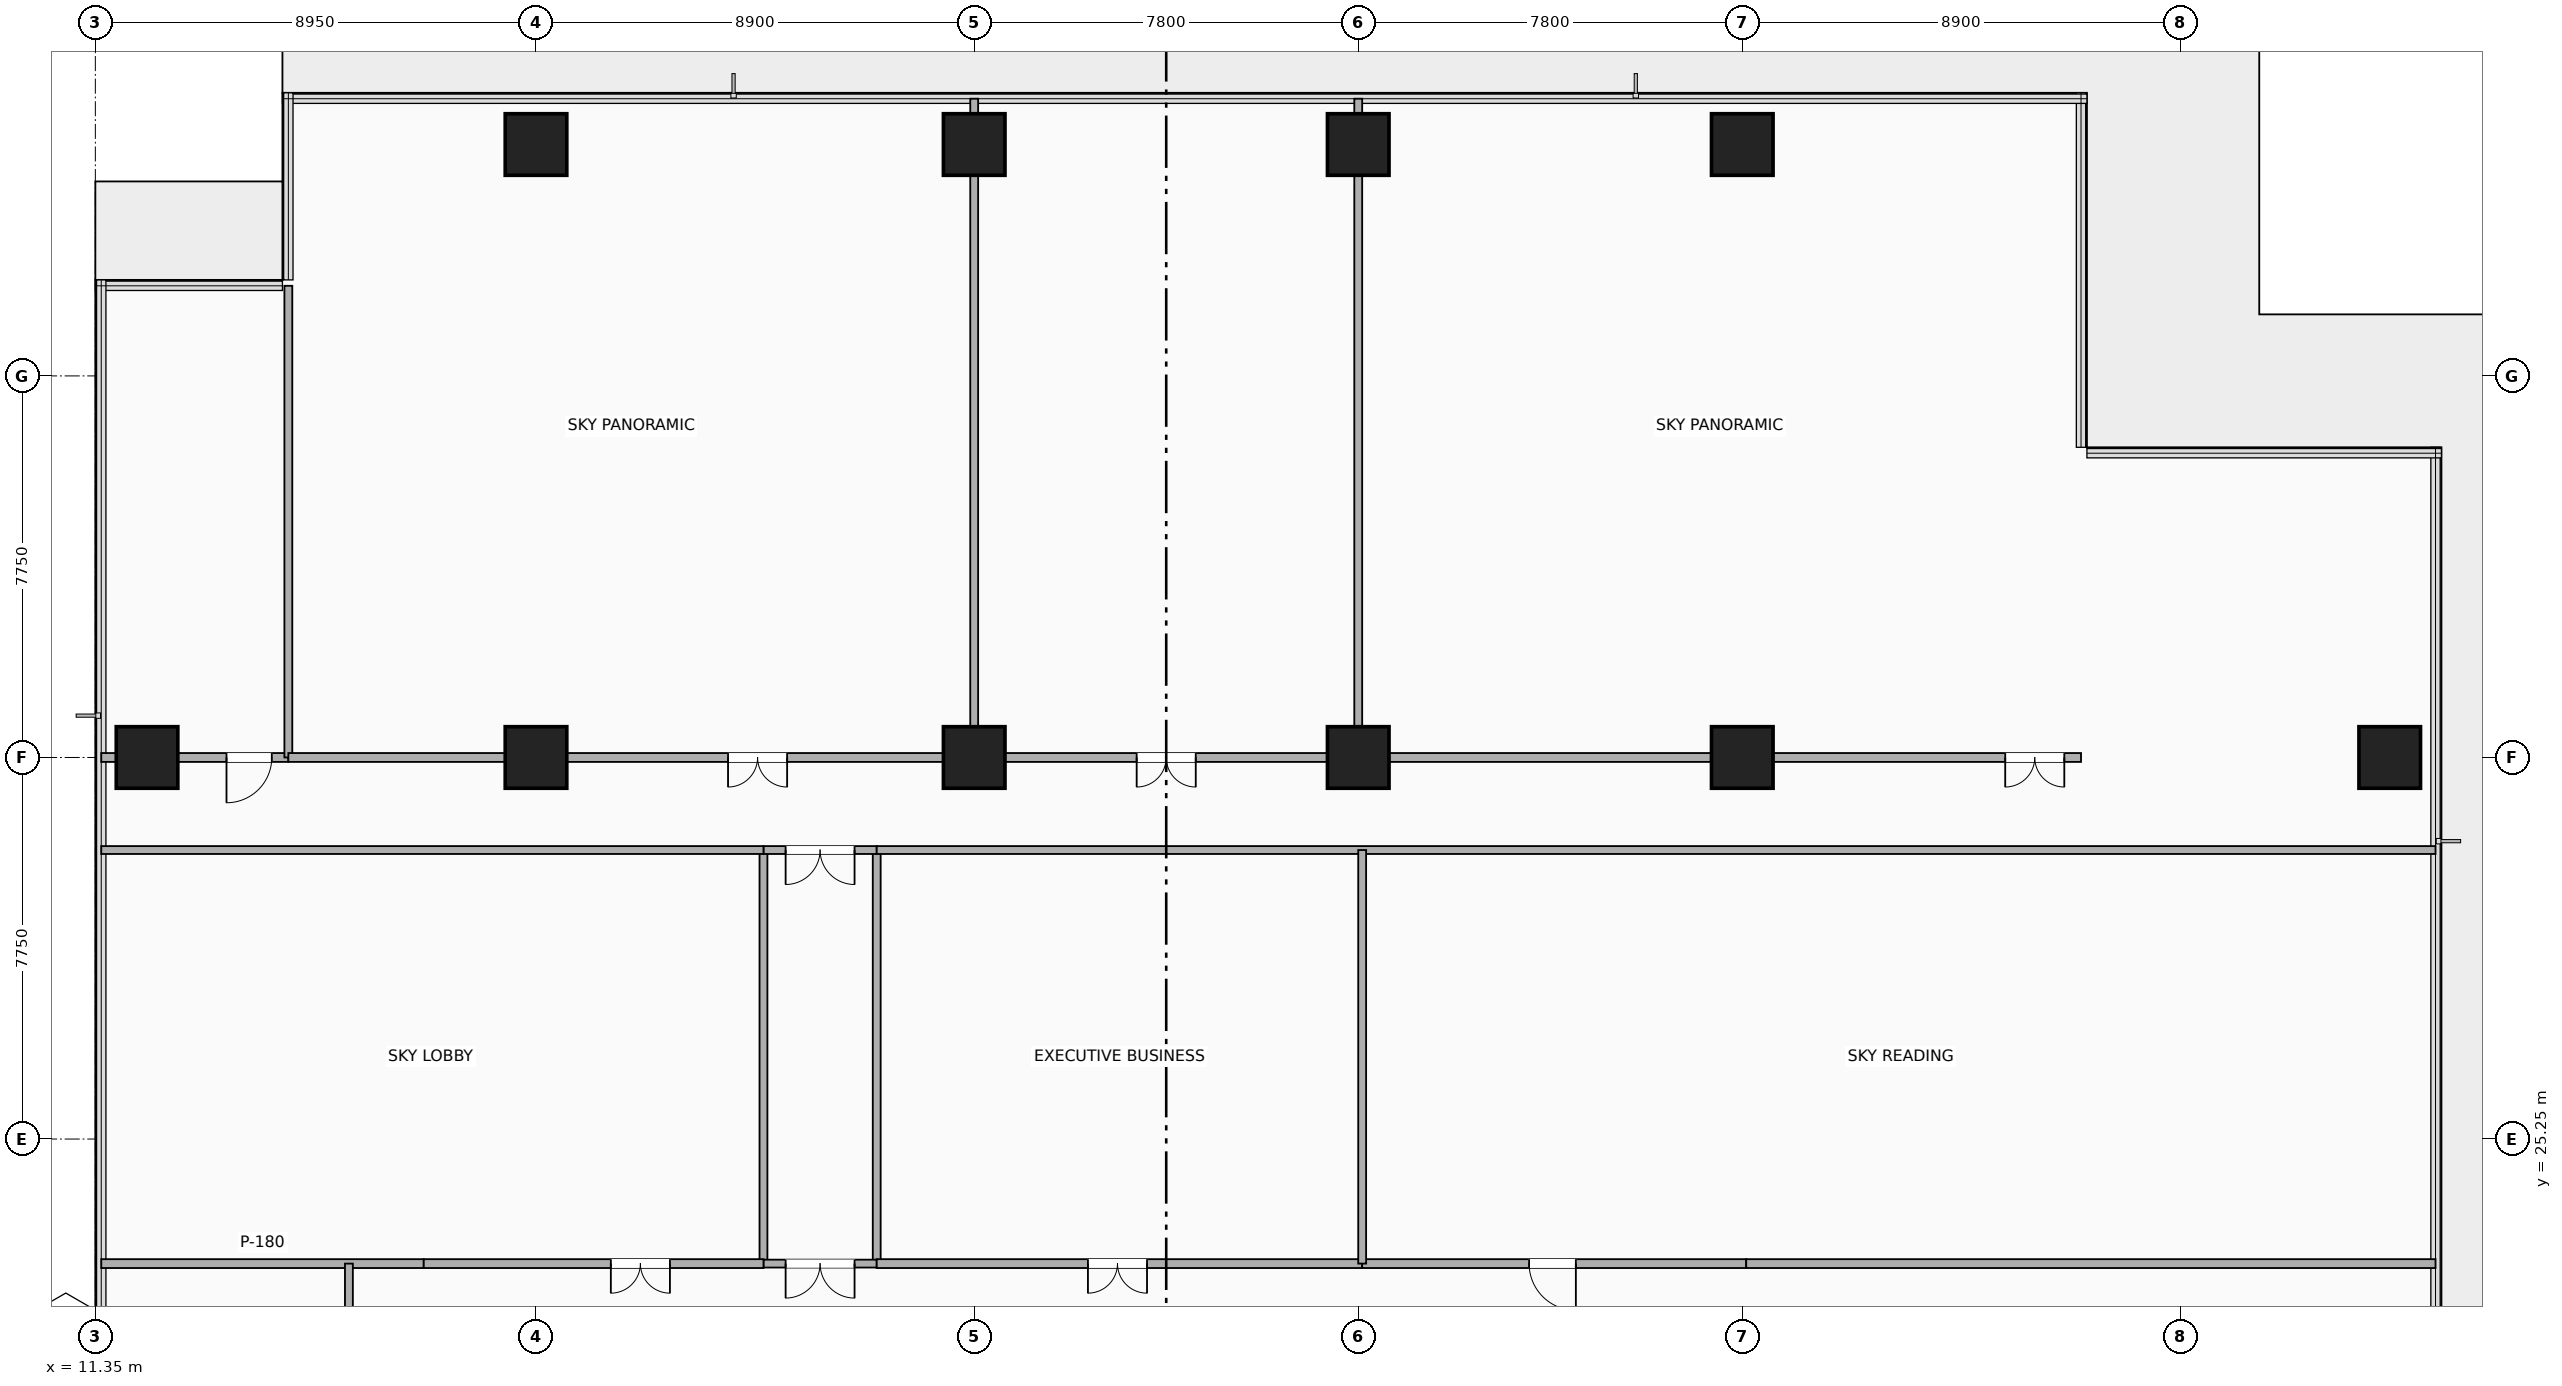
"""IFC4 building model, lengths in metres.
Left out: names, types, materials, properties, quantities, classifications, styles, units other than length and angle.
Written with IfcOpenShell. Run it as: python <this file> out.ifc"""

import sys

from ifc_helpers import new_model, si_unit, direction, frame, frame_2d, origin, origin_2d, place, context, subcontext, project, spatial, rectangle, extrude, element, fill, save


model = new_model("IFC4")
c1 = context("Model", 3, precision=1e-05, world=origin(), true_north=direction((0.0, 1.0)))
c2 = subcontext(c1, "Body", "Model", "MODEL_VIEW")
j1 = project(units=[si_unit("LENGTHUNIT", "METRE"), si_unit("PLANEANGLEUNIT", "RADIAN")], contexts=[c1])
p1 = place(None, origin())
s1 = spatial("IfcSite", under=j1, at=p1, CompositionType="ELEMENT")
p2 = place(p1, origin())
s2 = spatial("IfcBuilding", under=s1, at=p2, CompositionType="ELEMENT")
p3 = place(p2, frame((0.0, 0.0, 83.8)))
s3 = spatial("IfcBuildingStorey", under=s2, at=p3, CompositionType="ELEMENT", Elevation=83.8)
for number, where, z_axis, x_axis in (
    (1, (20.3, 33.0, -0.26), (0.0, 0.0, 1.0), (1.0, 0.0, 0.0)),
    (2, (29.2, 33.0, -0.26), (0.0, 0.0, 1.0), (1.0, 0.0, 0.0)),
    (3, (37.0, 33.0, -0.26), (0.0, 0.0, 1.0), (1.0, 0.0, 0.0)),
    (4, (44.8, 33.0, -0.26), (0.0, 0.0, 1.0), (1.0, 0.0, 0.0)),
    (5, (12.4, 33.0, -0.26), (0.0, 0.0, 1.0), (1.0, 0.0, 0.0)),
    (6, (57.95, 33.0, -0.26), (0.0, 0.0, 1.0), (1.0, 0.0, 0.0)),
    (7, (20.3, 45.45, -0.26), (0.0, 0.0, 1.0), (1.0, 0.0, 0.0)),
    (8, (29.2, 45.45, -0.26), (0.0, 0.0, 1.0), (1.0, 0.0, 0.0)),
    (9, (37.0, 45.45, -0.26), (0.0, 0.0, 1.0), (1.0, 0.0, 0.0)),
    (10, (44.8, 45.45, -0.26), (0.0, 0.0, 1.0), (1.0, 0.0, 0.0)),
):
    element("IfcColumn", number, at=place(p3, frame(where, z_axis=z_axis, x_axis=x_axis)), inside=s3, PredefinedType="COLUMN", context=c2, shape_type="SweptSolid", body=[
        extrude(rectangle(XDim=1.25, YDim=1.25, at=origin_2d()), origin(), (0.0, 0.0, 1.0), 4.4),
    ])
p4 = place(p3, frame((11.47, 22.72, 0.0), z_axis=(0.0, 0.0, 1.0), x_axis=(1.0, 0.0, 0.0)))
e11 = element("IfcWall", 11, at=p4, inside=s3, PredefinedType="PARTITIONING", context=c2, shape_type="SweptSolid", body=[
    extrude(rectangle(XDim=6.55, YDim=0.18, at=frame_2d((3.275, 0.0))), origin(), (0.0, 0.0, 1.0), 3.503),
])
p5 = place(p3, frame((16.5, 18.52, 0.0), z_axis=(0.0, 0.0, 1.0), x_axis=(0.0, 1.0, 0.0)))
e12 = element("IfcWall", 12, at=p5, inside=s3, PredefinedType="PARTITIONING", context=c2, shape_type="SweptSolid", body=[
    extrude(rectangle(XDim=4.2, YDim=0.16, at=frame_2d((2.1, 0.0))), origin(), (0.0, 0.0, 1.0), 3.213),
])
p6 = place(p5, frame((0.693, 0.0, 0.0)))
e13 = element("IfcOpeningElement", 13, at=p6, cuts=e12, PredefinedType="OPENING", context=c2, shape_type="SweptSolid", body=[
    extrude(rectangle(XDim=0.92, YDim=2.08, at=frame_2d((0.46, 1.04))), frame((0.0, 0.09, 0.0), z_axis=(0.0, -1.0, 0.0), x_axis=(1.0, 0.0, 0.0)), (0.0, 0.0, 1.0), 0.18),
])
p7 = place(p3, frame((11.47, 33.0, 0.0), z_axis=(0.0, 0.0, 1.0), x_axis=(1.0, 0.0, 0.0)))
e14 = element("IfcWall", 14, at=p7, inside=s3, PredefinedType="PARTITIONING", context=c2, shape_type="SweptSolid", body=[
    extrude(rectangle(XDim=3.8, YDim=0.18, at=frame_2d((1.9, 0.0))), origin(), (0.0, 0.0, 1.0), 3.213),
])
p8 = place(p7, frame((2.544, 0.0, 0.0)))
e15 = element("IfcOpeningElement", 15, at=p8, cuts=e14, PredefinedType="OPENING", context=c2, shape_type="SweptSolid", body=[
    extrude(rectangle(XDim=0.92, YDim=2.08, at=frame_2d((0.46, 1.04))), frame((0.0, 0.1, 0.0), z_axis=(0.0, -1.0, 0.0), x_axis=(1.0, 0.0, 0.0)), (0.0, 0.0, 1.0), 0.2),
])
p9 = place(p3, frame((15.27, 33.0, 0.0), z_axis=(0.0, 0.0, 1.0), x_axis=(0.0, 1.0, 0.0)))
e16 = element("IfcWall", 16, at=p9, inside=s3, PredefinedType="PARTITIONING", context=c2, shape_type="SweptSolid", body=[
    extrude(rectangle(XDim=9.58, YDim=0.16, at=frame_2d((4.79, 0.0))), origin(), (0.0, 0.0, 1.0), 3.213),
])
for number, where, z_axis, x_axis in (
    (17, (24.92, 22.72, 0.0), (0.0, 0.0, 1.0), (0.0, 1.0, 0.0)),
    (18, (27.22, 22.72, 0.0), (0.0, 0.0, 1.0), (0.0, 1.0, 0.0)),
):
    element("IfcWall", number, at=place(p3, frame(where, z_axis=z_axis, x_axis=x_axis)), inside=s3, PredefinedType="PARTITIONING", context=c2, shape_type="SweptSolid", body=[
        extrude(rectangle(XDim=8.4, YDim=0.16, at=frame_2d((4.2, 0.0))), origin(), (0.0, 0.0, 1.0), 3.718),
    ])
p10 = place(p3, frame((24.92, 22.72, 0.0), z_axis=(0.0, 0.0, 1.0), x_axis=(1.0, 0.0, 0.0)))
e19 = element("IfcWall", 19, at=p10, inside=s3, PredefinedType="PARTITIONING", context=c2, shape_type="SweptSolid", body=[
    extrude(rectangle(XDim=2.3, YDim=0.16, at=frame_2d((1.15, 0.0))), origin(), (0.0, 0.0, 1.0), 4.14),
])
p11 = place(p10, frame((0.45, 0.0, 0.0)))
e20 = element("IfcOpeningElement", 20, at=p11, cuts=e19, PredefinedType="OPENING", context=c2, shape_type="SweptSolid", body=[
    extrude(rectangle(XDim=1.4, YDim=2.2, at=frame_2d((0.7, 1.1))), frame((0.0, 0.09, 0.0), z_axis=(0.0, -1.0, 0.0), x_axis=(1.0, 0.0, 0.0)), (0.0, 0.0, 1.0), 0.18),
])
p12 = place(p3, frame((24.92, 31.12, 0.0), z_axis=(0.0, 0.0, 1.0), x_axis=(1.0, 0.0, 0.0)))
e21 = element("IfcWall", 21, at=p12, inside=s3, PredefinedType="PARTITIONING", context=c2, shape_type="SweptSolid", body=[
    extrude(rectangle(XDim=2.3, YDim=0.16, at=frame_2d((1.15, 0.0))), origin(), (0.0, 0.0, 1.0), 4.14),
])
p13 = place(p12, frame((0.45, 0.0, 0.0)))
e22 = element("IfcOpeningElement", 22, at=p13, cuts=e21, PredefinedType="OPENING", context=c2, shape_type="SweptSolid", body=[
    extrude(rectangle(XDim=1.4, YDim=2.2, at=frame_2d((0.7, 1.1))), frame((0.0, 0.09, 0.0), z_axis=(0.0, -1.0, 0.0), x_axis=(1.0, 0.0, 0.0)), (0.0, 0.0, 1.0), 0.18),
])
p14 = place(p3, frame((11.47, 31.12, 0.0), z_axis=(0.0, 0.0, 1.0), x_axis=(1.0, 0.0, 0.0)))
e23 = element("IfcWall", 23, at=p14, inside=s3, PredefinedType="PARTITIONING", context=c2, shape_type="SweptSolid", body=[
    extrude(rectangle(XDim=13.45, YDim=0.16, at=frame_2d((6.725, 0.0))), origin(), (0.0, 0.0, 1.0), 3.213),
])
p15 = place(p3, frame((27.22, 31.12, 0.0), z_axis=(0.0, 0.0, 1.0), x_axis=(1.0, 0.0, 0.0)))
e24 = element("IfcWall", 24, at=p15, inside=s3, PredefinedType="PARTITIONING", context=c2, shape_type="SweptSolid", body=[
    extrude(rectangle(XDim=31.66, YDim=0.16, at=frame_2d((15.83, 0.0))), origin(), (0.0, 0.0, 1.0), 3.213),
])
p16 = place(p3, frame((18.02, 22.72, 0.0), z_axis=(0.0, 0.0, 1.0), x_axis=(1.0, 0.0, 0.0)))
e25 = element("IfcWall", 25, at=p16, inside=s3, PredefinedType="PARTITIONING", context=c2, shape_type="SweptSolid", body=[
    extrude(rectangle(XDim=6.9, YDim=0.18, at=frame_2d((3.45, 0.0))), origin(), (0.0, 0.0, 1.0), 3.213),
])
p17 = place(p16, frame((3.8, 0.0, 0.0)))
e26 = element("IfcOpeningElement", 26, at=p17, cuts=e25, PredefinedType="OPENING", context=c2, shape_type="SweptSolid", body=[
    extrude(rectangle(XDim=1.2, YDim=2.14, at=frame_2d((0.6, 1.07))), frame((0.0, 0.1, 0.0), z_axis=(0.0, -1.0, 0.0), x_axis=(1.0, 0.0, 0.0)), (0.0, 0.0, 1.0), 0.2),
])
p18 = place(p3, frame((27.22, 22.72, 0.0), z_axis=(0.0, 0.0, 1.0), x_axis=(1.0, 0.0, 0.0)))
e27 = element("IfcWall", 27, at=p18, inside=s3, PredefinedType="PARTITIONING", context=c2, shape_type="SweptSolid", body=[
    extrude(rectangle(XDim=9.86, YDim=0.18, at=frame_2d((4.93, 0.0))), origin(), (0.0, 0.0, 1.0), 3.213),
])
p19 = place(p18, frame((4.29, 0.0, 0.0)))
e28 = element("IfcOpeningElement", 28, at=p19, cuts=e27, PredefinedType="OPENING", context=c2, shape_type="SweptSolid", body=[
    extrude(rectangle(XDim=1.2, YDim=2.14, at=frame_2d((0.6, 1.07))), frame((0.0, 0.1, 0.0), z_axis=(0.0, -1.0, 0.0), x_axis=(1.0, 0.0, 0.0)), (0.0, 0.0, 1.0), 0.2),
])
p20 = place(p3, frame((37.08, 22.72, 0.0), z_axis=(0.0, 0.0, 1.0), x_axis=(1.0, 0.0, 0.0)))
e29 = element("IfcWall", 29, at=p20, inside=s3, PredefinedType="PARTITIONING", context=c2, shape_type="SweptSolid", body=[
    extrude(rectangle(XDim=7.8, YDim=0.18, at=frame_2d((3.9, 0.0))), origin(), (0.0, 0.0, 1.0), 3.213),
])
p21 = place(p20, frame((3.39, 0.0, 0.0)))
e30 = element("IfcOpeningElement", 30, at=p21, cuts=e29, PredefinedType="OPENING", context=c2, shape_type="SweptSolid", body=[
    extrude(rectangle(XDim=0.95, YDim=2.15, at=frame_2d((0.475, 1.075))), frame((0.0, 0.1, 0.0), z_axis=(0.0, -1.0, 0.0), x_axis=(1.0, 0.0, 0.0)), (0.0, 0.0, 1.0), 0.2),
])
p22 = place(p3, frame((44.88, 22.72, 0.0), z_axis=(0.0, 0.0, 1.0), x_axis=(1.0, 0.0, 0.0)))
e31 = element("IfcWall", 31, at=p22, inside=s3, PredefinedType="PARTITIONING", context=c2, shape_type="SweptSolid", body=[
    extrude(rectangle(XDim=14.0, YDim=0.18, at=frame_2d((7.0, 0.0))), origin(), (0.0, 0.0, 1.0), 3.213),
])
p23 = place(p3, frame((37.08, 22.72, 0.0), z_axis=(0.0, 0.0, 1.0), x_axis=(0.0, 1.0, 0.0)))
e32 = element("IfcWall", 32, at=p23, inside=s3, PredefinedType="PARTITIONING", context=c2, shape_type="SweptSolid", body=[
    extrude(rectangle(XDim=8.4, YDim=0.16, at=frame_2d((4.2, 0.0))), origin(), (0.0, 0.0, 1.0), 3.213),
])
p24 = place(p3, frame((15.27, 33.0, 0.0), z_axis=(0.0, 0.0, 1.0), x_axis=(1.0, 0.0, 0.0)))
e33 = element("IfcWall", 33, at=p24, inside=s3, PredefinedType="PARTITIONING", context=c2, shape_type="SweptSolid", body=[
    extrude(rectangle(XDim=13.93, YDim=0.18, at=frame_2d((6.965, 0.0))), origin(), (0.0, 0.0, 1.0), 3.213),
])
p25 = place(p24, frame((8.93, 0.0, 0.0)))
e34 = element("IfcOpeningElement", 34, at=p25, cuts=e33, PredefinedType="OPENING", context=c2, shape_type="SweptSolid", body=[
    extrude(rectangle(XDim=1.2, YDim=2.14, at=frame_2d((0.6, 1.07))), frame((0.0, 0.1, 0.0), z_axis=(0.0, -1.0, 0.0), x_axis=(1.0, 0.0, 0.0)), (0.0, 0.0, 1.0), 0.2),
])
p26 = place(p3, frame((29.2, 33.0, 0.0), z_axis=(0.0, 0.0, 1.0), x_axis=(0.0, 1.0, 0.0)))
e35 = element("IfcWall", 35, at=p26, inside=s3, PredefinedType="PARTITIONING", context=c2, shape_type="SweptSolid", body=[
    extrude(rectangle(XDim=13.38, YDim=0.16, at=frame_2d((6.69, 0.0))), origin(), (0.0, 0.0, 1.0), 3.213),
])
p27 = place(p3, frame((29.2, 33.0, 0.0), z_axis=(0.0, 0.0, 1.0), x_axis=(1.0, 0.0, 0.0)))
e36 = element("IfcWall", 36, at=p27, inside=s3, PredefinedType="PARTITIONING", context=c2, shape_type="SweptSolid", body=[
    extrude(rectangle(XDim=7.8, YDim=0.18, at=frame_2d((3.9, 0.0))), origin(), (0.0, 0.0, 1.0), 3.213),
])
p28 = place(p27, frame((3.3, 0.0, 0.0)))
e37 = element("IfcOpeningElement", 37, at=p28, cuts=e36, PredefinedType="OPENING", context=c2, shape_type="SweptSolid", body=[
    extrude(rectangle(XDim=1.2, YDim=2.14, at=frame_2d((0.6, 1.07))), frame((0.0, 0.1, 0.0), z_axis=(0.0, -1.0, 0.0), x_axis=(1.0, 0.0, 0.0)), (0.0, 0.0, 1.0), 0.2),
])
p29 = place(p3, frame((37.0, 33.0, 0.0), z_axis=(0.0, 0.0, 1.0), x_axis=(0.0, 1.0, 0.0)))
e38 = element("IfcWall", 38, at=p29, inside=s3, PredefinedType="PARTITIONING", context=c2, shape_type="SweptSolid", body=[
    extrude(rectangle(XDim=13.38, YDim=0.16, at=frame_2d((6.69, 0.0))), origin(), (0.0, 0.0, 1.0), 3.213),
])
p30 = place(p3, frame((37.0, 33.0, 0.0), z_axis=(0.0, 0.0, 1.0), x_axis=(1.0, 0.0, 0.0)))
e39 = element("IfcWall", 39, at=p30, inside=s3, PredefinedType="PARTITIONING", context=c2, shape_type="SweptSolid", body=[
    extrude(rectangle(XDim=14.68, YDim=0.18, at=frame_2d((7.34, 0.0))), origin(), (0.0, 0.0, 1.0), 3.213),
])
p31 = place(p30, frame((13.14, 0.0, 0.0)))
e40 = element("IfcOpeningElement", 40, at=p31, cuts=e39, PredefinedType="OPENING", context=c2, shape_type="SweptSolid", body=[
    extrude(rectangle(XDim=1.2, YDim=2.14, at=frame_2d((0.6, 1.07))), frame((0.0, 0.1, 0.0), z_axis=(0.0, -1.0, 0.0), x_axis=(1.0, 0.0, 0.0)), (0.0, 0.0, 1.0), 0.2),
])
p32 = place(p8, origin())
e41 = element("IfcDoor", 41, at=p32, inside=s3, OperationType="SINGLE_SWING_LEFT", PredefinedType="DOOR", context=c2, shape_type="SweptSolid", body=[
    extrude(rectangle(XDim=0.92, YDim=2.08, at=frame_2d((0.46, 1.04))), frame((0.0, 0.025, 0.0), z_axis=(0.0, -1.0, 0.0), x_axis=(1.0, 0.0, 0.0)), (0.0, 0.0, 1.0), 0.05),
])
fill(e15, e41)
p33 = place(p11, origin())
e42 = element("IfcDoor", 42, at=p33, inside=s3, OperationType="DOUBLE_DOOR_SINGLE_SWING", PredefinedType="DOOR", context=c2, shape_type="SweptSolid", body=[
    extrude(rectangle(XDim=1.4, YDim=2.2, at=frame_2d((0.7, 1.1))), frame((0.0, 0.025, 0.0), z_axis=(0.0, -1.0, 0.0), x_axis=(1.0, 0.0, 0.0)), (0.0, 0.0, 1.0), 0.05),
])
fill(e20, e42)
p34 = place(p13, origin())
e43 = element("IfcDoor", 43, at=p34, inside=s3, OperationType="DOUBLE_DOOR_SINGLE_SWING", PredefinedType="DOOR", context=c2, shape_type="SweptSolid", body=[
    extrude(rectangle(XDim=1.4, YDim=2.2, at=frame_2d((0.7, 1.1))), frame((0.0, 0.025, 0.0), z_axis=(0.0, -1.0, 0.0), x_axis=(1.0, 0.0, 0.0)), (0.0, 0.0, 1.0), 0.05),
])
fill(e22, e43)
p35 = place(p17, origin())
e44 = element("IfcDoor", 44, at=p35, inside=s3, OperationType="DOUBLE_DOOR_SINGLE_SWING", PredefinedType="DOOR", context=c2, shape_type="SweptSolid", body=[
    extrude(rectangle(XDim=1.2, YDim=2.14, at=frame_2d((0.6, 1.07))), frame((0.0, 0.025, 0.0), z_axis=(0.0, -1.0, 0.0), x_axis=(1.0, 0.0, 0.0)), (0.0, 0.0, 1.0), 0.05),
])
fill(e26, e44)
p36 = place(p19, origin())
e45 = element("IfcDoor", 45, at=p36, inside=s3, OperationType="DOUBLE_DOOR_SINGLE_SWING", PredefinedType="DOOR", context=c2, shape_type="SweptSolid", body=[
    extrude(rectangle(XDim=1.2, YDim=2.14, at=frame_2d((0.6, 1.07))), frame((0.0, 0.025, 0.0), z_axis=(0.0, -1.0, 0.0), x_axis=(1.0, 0.0, 0.0)), (0.0, 0.0, 1.0), 0.05),
])
fill(e28, e45)
p37 = place(p21, origin())
e46 = element("IfcDoor", 46, at=p37, inside=s3, OperationType="SINGLE_SWING_RIGHT", PredefinedType="DOOR", context=c2, shape_type="SweptSolid", body=[
    extrude(rectangle(XDim=0.95, YDim=2.15, at=frame_2d((0.475, 1.075))), frame((0.0, 0.025, 0.0), z_axis=(0.0, -1.0, 0.0), x_axis=(1.0, 0.0, 0.0)), (0.0, 0.0, 1.0), 0.05),
])
fill(e30, e46)
p38 = place(p25, origin())
e47 = element("IfcDoor", 47, at=p38, inside=s3, OperationType="DOUBLE_DOOR_SINGLE_SWING", PredefinedType="DOOR", context=c2, shape_type="SweptSolid", body=[
    extrude(rectangle(XDim=1.2, YDim=2.14, at=frame_2d((0.6, 1.07))), frame((0.0, 0.025, 0.0), z_axis=(0.0, -1.0, 0.0), x_axis=(1.0, 0.0, 0.0)), (0.0, 0.0, 1.0), 0.05),
])
fill(e34, e47)
p39 = place(p28, origin())
e48 = element("IfcDoor", 48, at=p39, inside=s3, OperationType="DOUBLE_DOOR_SINGLE_SWING", PredefinedType="DOOR", context=c2, shape_type="SweptSolid", body=[
    extrude(rectangle(XDim=1.2, YDim=2.14, at=frame_2d((0.6, 1.07))), frame((0.0, 0.025, 0.0), z_axis=(0.0, -1.0, 0.0), x_axis=(1.0, 0.0, 0.0)), (0.0, 0.0, 1.0), 0.05),
])
fill(e37, e48)
p40 = place(p31, origin())
e49 = element("IfcDoor", 49, at=p40, inside=s3, OperationType="DOUBLE_DOOR_SINGLE_SWING", PredefinedType="DOOR", context=c2, shape_type="SweptSolid", body=[
    extrude(rectangle(XDim=1.2, YDim=2.14, at=frame_2d((0.6, 1.07))), frame((0.0, 0.025, 0.0), z_axis=(0.0, -1.0, 0.0), x_axis=(1.0, 0.0, 0.0)), (0.0, 0.0, 1.0), 0.05),
])
fill(e40, e49)
save(model, sys.argv[1])
